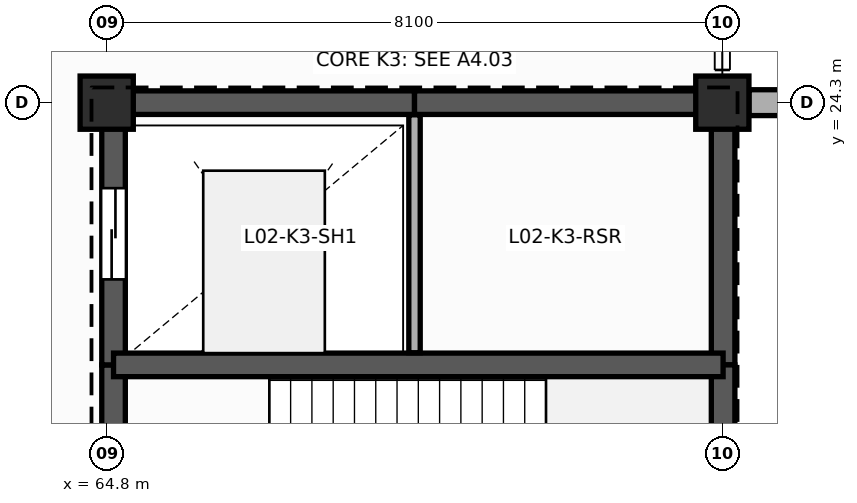
"""IFC4 building model, lengths in metres.
Left out: names, types, materials, properties, quantities, classifications, styles, units other than length and angle.
Written with IfcOpenShell. Run it as: python <this file> out.ifc"""

import sys

from ifc_helpers import new_model, si_unit, direction, frame, frame_2d, origin, origin_2d, place, context, subcontext, project, spatial, rectangle, extrude, element, fill, save


model = new_model("IFC4")
c1 = context("Model", 3, precision=1e-05, world=origin(), true_north=direction((0.0, 1.0)))
c2 = subcontext(c1, "Body", "Model", "MODEL_VIEW")
j1 = project(units=[si_unit("LENGTHUNIT", "METRE"), si_unit("PLANEANGLEUNIT", "RADIAN")], contexts=[c1])
p1 = place(None, origin())
s1 = spatial("IfcSite", under=j1, at=p1, CompositionType="ELEMENT")
p2 = place(p1, origin())
s2 = spatial("IfcBuilding", under=s1, at=p2, CompositionType="ELEMENT")
p3 = place(p2, frame((0.0, 0.0, 10.2)))
s3 = spatial("IfcBuildingStorey", under=s2, at=p3, CompositionType="ELEMENT", Elevation=10.2)
for number, where, z_axis, x_axis in (
    (1, (64.8, 24.3, 0.0), (0.0, 0.0, 1.0), (1.0, 0.0, 0.0)),
    (2, (72.9, 24.3, 0.0), (0.0, 0.0, 1.0), (1.0, 0.0, 0.0)),
):
    element("IfcColumn", number, at=place(p3, frame(where, z_axis=z_axis, x_axis=x_axis)), inside=s3, PredefinedType="COLUMN", context=c2, shape_type="SweptSolid", body=[
        extrude(rectangle(XDim=0.7, YDim=0.7, at=origin_2d()), origin(), (0.0, 0.0, 1.0), 4.8),
    ])
p4 = place(p3, frame((73.25, 24.3, 0.0), z_axis=(0.0, 0.0, 1.0), x_axis=(1.0, 0.0, 0.0)))
e3 = element("IfcWall", 3, at=p4, inside=s3, PredefinedType="SOLIDWALL", context=c2, shape_type="SweptSolid", body=[
    extrude(rectangle(XDim=7.45, YDim=0.34, at=frame_2d((3.725, 0.0))), origin(), (0.0, 0.0, 1.0), 4.325),
])
p5 = place(p3, frame((64.89, 16.45, 0.0), z_axis=(0.0, 0.0, 1.0), x_axis=(0.0, 1.0, 0.0)))
e4 = element("IfcWall", 4, at=p5, inside=s3, PredefinedType="SHEAR", context=c2, shape_type="SweptSolid", body=[
    extrude(rectangle(XDim=4.4, YDim=0.31, at=frame_2d((2.2, 0.0))), origin(), (0.0, 0.0, 1.0), 4.8),
])
p6 = place(p5, frame((1.35, 0.0, 0.0)))
e5 = element("IfcOpeningElement", 5, at=p6, cuts=e4, PredefinedType="OPENING", context=c2, shape_type="SweptSolid", body=[
    extrude(rectangle(XDim=1.2, YDim=2.25, at=frame_2d((0.6, 1.125))), frame((0.0, 0.165, 0.0), z_axis=(0.0, -1.0, 0.0), x_axis=(1.0, 0.0, 0.0)), (0.0, 0.0, 1.0), 0.33),
])
p7 = place(p3, frame((64.89, 20.85, 0.0), z_axis=(0.0, 0.0, 1.0), x_axis=(0.0, 1.0, 0.0)))
e6 = element("IfcWall", 6, at=p7, inside=s3, PredefinedType="SHEAR", context=c2, shape_type="SweptSolid", body=[
    extrude(rectangle(XDim=3.45, YDim=0.31, at=frame_2d((1.725, 0.0))), origin(), (0.0, 0.0, 1.0), 4.8),
])
p8 = place(p7, frame((1.125, 0.0, 0.0)))
e7 = element("IfcOpeningElement", 7, at=p8, cuts=e6, PredefinedType="OPENING", context=c2, shape_type="SweptSolid", body=[
    extrude(rectangle(XDim=1.2, YDim=2.2, at=frame_2d((0.6, 1.1))), frame((0.0, 0.165, 0.0), z_axis=(0.0, -1.0, 0.0), x_axis=(1.0, 0.0, 0.0)), (0.0, 0.0, 1.0), 0.33),
])
p9 = place(p3, frame((64.89, 24.3, 0.0), z_axis=(0.0, 0.0, 1.0), x_axis=(1.0, 0.0, 0.0)))
e8 = element("IfcWall", 8, at=p9, inside=s3, PredefinedType="SHEAR", context=c2, shape_type="SweptSolid", body=[
    extrude(rectangle(XDim=3.96, YDim=0.31, at=frame_2d((1.98, 0.0))), origin(), (0.0, 0.0, 1.0), 4.8),
])
p10 = place(p3, frame((68.85, 24.3, 0.0), z_axis=(0.0, 0.0, 1.0), x_axis=(1.0, 0.0, 0.0)))
e9 = element("IfcWall", 9, at=p10, inside=s3, PredefinedType="SHEAR", context=c2, shape_type="SweptSolid", body=[
    extrude(rectangle(XDim=4.06, YDim=0.31, at=frame_2d((2.03, 0.0))), origin(), (0.0, 0.0, 1.0), 4.8),
])
p11 = place(p3, frame((72.91, 24.3, 0.0), z_axis=(0.0, 0.0, 1.0), x_axis=(0.0, -1.0, 0.0)))
e10 = element("IfcWall", 10, at=p11, inside=s3, PredefinedType="SHEAR", context=c2, shape_type="SweptSolid", body=[
    extrude(rectangle(XDim=3.45, YDim=0.31, at=frame_2d((1.725, 0.0))), origin(), (0.0, 0.0, 1.0), 4.8),
])
p12 = place(p3, frame((72.91, 20.85, 0.0), z_axis=(0.0, 0.0, 1.0), x_axis=(0.0, -1.0, 0.0)))
e11 = element("IfcWall", 11, at=p12, inside=s3, PredefinedType="SHEAR", context=c2, shape_type="SweptSolid", body=[
    extrude(rectangle(XDim=4.4, YDim=0.31, at=frame_2d((2.2, 0.0))), origin(), (0.0, 0.0, 1.0), 4.8),
])
p13 = place(p3, frame((64.89, 20.85, 0.0), z_axis=(0.0, 0.0, 1.0), x_axis=(1.0, 0.0, 0.0)))
e12 = element("IfcWall", 12, at=p13, inside=s3, PredefinedType="SHEAR", context=c2, shape_type="SweptSolid", body=[
    extrude(rectangle(XDim=8.02, YDim=0.31, at=frame_2d((4.01, 0.0))), origin(), (0.0, 0.0, 1.0), 4.8),
])
p14 = place(p3, frame((68.85, 21.01, 0.0), z_axis=(0.0, 0.0, 1.0), x_axis=(0.0, 1.0, 0.0)))
e13 = element("IfcWall", 13, at=p14, inside=s3, PredefinedType="PLUMBINGWALL", context=c2, shape_type="SweptSolid", body=[
    extrude(rectangle(XDim=3.13, YDim=0.15, at=frame_2d((1.565, 0.0))), origin(), (0.0, 0.0, 1.0), 4.45),
])
p15 = place(p8, origin())
e14 = element("IfcDoor", 14, at=p15, inside=s3, OperationType="SLIDING_TO_LEFT", PredefinedType="DOOR", context=c2, shape_type="SweptSolid", body=[
    extrude(rectangle(XDim=1.2, YDim=2.2, at=frame_2d((0.6, 1.1))), frame((0.0, 0.025, 0.0), z_axis=(0.0, -1.0, 0.0), x_axis=(1.0, 0.0, 0.0)), (0.0, 0.0, 1.0), 0.05),
])
fill(e7, e14)
save(model, sys.argv[1])
